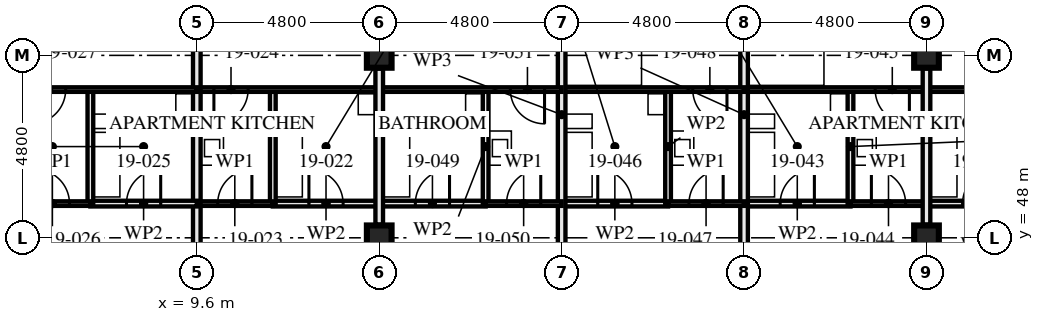
"""IFC4 building model, lengths in metres.
Left out: names, types, materials, properties, quantities, classifications, styles, units other than length and angle.
Written with IfcOpenShell. Run it as: python <this file> out.ifc"""

import sys

from ifc_helpers import new_model, si_unit, direction, frame, frame_2d, origin, origin_2d, place, context, subcontext, project, spatial, rectangle, hollow_rectangle, extrude, element, fill, save


model = new_model("IFC4")
c1 = context("Model", 3, precision=1e-05, world=origin(), true_north=direction((0.0, 1.0)))
c2 = subcontext(c1, "Body", "Model", "MODEL_VIEW")
j1 = project(units=[si_unit("LENGTHUNIT", "METRE"), si_unit("PLANEANGLEUNIT", "RADIAN")], contexts=[c1])
p1 = place(None, origin())
s1 = spatial("IfcSite", under=j1, at=p1, CompositionType="ELEMENT")
p2 = place(p1, origin())
s2 = spatial("IfcBuilding", under=s1, at=p2, CompositionType="ELEMENT")
p3 = place(p2, frame((0.0, 0.0, 72.5)))
s3 = spatial("IfcBuildingStorey", under=s2, at=p3, CompositionType="ELEMENT", Elevation=72.5)
for number, where, z_axis, x_axis in (
    (1, (14.4, 48.0, 0.0), (0.0, 0.0, 1.0), (1.0, 0.0, 0.0)),
    (2, (14.4, 52.8, 0.0), (0.0, 0.0, 1.0), (1.0, 0.0, 0.0)),
    (3, (28.8, 48.0, 0.0), (0.0, 0.0, 1.0), (1.0, 0.0, 0.0)),
    (4, (28.8, 52.8, 0.0), (0.0, 0.0, 1.0), (1.0, 0.0, 0.0)),
):
    element("IfcColumn", number, at=place(p3, frame(where, z_axis=z_axis, x_axis=x_axis)), inside=s3, PredefinedType="COLUMN", context=c2, shape_type="SweptSolid", body=[
        extrude(hollow_rectangle(XDim=0.65, YDim=0.65, WallThickness=0.05, at=origin_2d()), origin(), (0.0, 0.0, 1.0), 3.5),
    ])
p4 = place(p3, frame((11.6, 51.9, 0.0), z_axis=(0.0, 0.0, 1.0), x_axis=(0.0, -1.0, 0.0)))
e5 = element("IfcWall", 5, at=p4, inside=s3, PredefinedType="PARTITIONING", context=c2, shape_type="SweptSolid", body=[
    extrude(rectangle(XDim=3.0, YDim=0.15, at=frame_2d((1.5, 0.0))), origin(), (0.0, 0.0, 1.0), 3.33),
])
p5 = place(p3, frame((14.4, 48.9, 0.0), z_axis=(0.0, 0.0, 1.0), x_axis=(-1.0, 0.0, 0.0)))
e6 = element("IfcWall", 6, at=p5, inside=s3, PredefinedType="PARTITIONING", context=c2, shape_type="SweptSolid", body=[
    extrude(rectangle(XDim=2.8, YDim=0.15, at=frame_2d((1.4, 0.0))), origin(), (0.0, 0.0, 1.0), 3.33),
])
p6 = place(p5, frame((0.95, 0.0, 0.0)))
e7 = element("IfcOpeningElement", 7, at=p6, cuts=e6, PredefinedType="OPENING", context=c2, shape_type="SweptSolid", body=[
    extrude(rectangle(XDim=0.9, YDim=2.1, at=frame_2d((0.45, 1.05))), frame((0.0, 0.085, 0.0), z_axis=(0.0, -1.0, 0.0), x_axis=(1.0, 0.0, 0.0)), (0.0, 0.0, 1.0), 0.171),
])
p7 = place(p3, frame((11.6, 48.9, 0.0), z_axis=(0.0, 0.0, 1.0), x_axis=(-1.0, 0.0, 0.0)))
e8 = element("IfcWall", 8, at=p7, inside=s3, PredefinedType="PARTITIONING", context=c2, shape_type="SweptSolid", body=[
    extrude(rectangle(XDim=2.0, YDim=0.12, at=frame_2d((1.0, 0.0))), origin(), (0.0, 0.0, 1.0), 3.33),
])
p8 = place(p7, frame((0.55, 0.0, 0.0)))
e9 = element("IfcOpeningElement", 9, at=p8, cuts=e8, PredefinedType="OPENING", context=c2, shape_type="SweptSolid", body=[
    extrude(rectangle(XDim=0.9, YDim=2.1, at=frame_2d((0.45, 1.05))), frame((0.0, 0.071, 0.0), z_axis=(0.0, -1.0, 0.0), x_axis=(1.0, 0.0, 0.0)), (0.0, 0.0, 1.0), 0.141),
])
p9 = place(p3, frame((14.4, 51.9, 0.0), z_axis=(0.0, 0.0, 1.0), x_axis=(-1.0, 0.0, 0.0)))
e10 = element("IfcWall", 10, at=p9, inside=s3, PredefinedType="PARTITIONING", context=c2, shape_type="SweptSolid", body=[
    extrude(rectangle(XDim=4.8, YDim=0.12, at=frame_2d((2.4, 0.0))), origin(), (0.0, 0.0, 1.0), 3.33),
])
p10 = place(p9, frame((3.45, 0.0, 0.0)))
e11 = element("IfcOpeningElement", 11, at=p10, cuts=e10, PredefinedType="OPENING", context=c2, shape_type="SweptSolid", body=[
    extrude(rectangle(XDim=0.9, YDim=2.1, at=frame_2d((0.45, 1.05))), frame((0.0, 0.071, 0.0), z_axis=(0.0, -1.0, 0.0), x_axis=(1.0, 0.0, 0.0)), (0.0, 0.0, 1.0), 0.141),
])
p11 = place(p3, frame((9.6, 57.28, 0.0), z_axis=(0.0, 0.0, 1.0), x_axis=(0.0, -1.0, 0.0)))
e12 = element("IfcWall", 12, at=p11, inside=s3, PredefinedType="PARTITIONING", context=c2, shape_type="SweptSolid", body=[
    extrude(rectangle(XDim=12.08, YDim=0.2, at=frame_2d((6.04, 0.0))), origin(), (0.0, 0.0, 1.0), 2.55),
])
p12 = place(p3, frame((6.8, 51.9, 0.0), z_axis=(0.0, 0.0, 1.0), x_axis=(0.0, -1.0, 0.0)))
e13 = element("IfcWall", 13, at=p12, inside=s3, PredefinedType="PARTITIONING", context=c2, shape_type="SweptSolid", body=[
    extrude(rectangle(XDim=3.0, YDim=0.15, at=frame_2d((1.5, 0.0))), origin(), (0.0, 0.0, 1.0), 3.33),
])
p13 = place(p3, frame((9.6, 48.9, 0.0), z_axis=(0.0, 0.0, 1.0), x_axis=(-1.0, 0.0, 0.0)))
e14 = element("IfcWall", 14, at=p13, inside=s3, PredefinedType="PARTITIONING", context=c2, shape_type="SweptSolid", body=[
    extrude(rectangle(XDim=2.8, YDim=0.15, at=frame_2d((1.4, 0.0))), origin(), (0.0, 0.0, 1.0), 3.33),
])
p14 = place(p13, frame((0.95, 0.0, 0.0)))
e15 = element("IfcOpeningElement", 15, at=p14, cuts=e14, PredefinedType="OPENING", context=c2, shape_type="SweptSolid", body=[
    extrude(rectangle(XDim=0.9, YDim=2.1, at=frame_2d((0.45, 1.05))), frame((0.0, 0.085, 0.0), z_axis=(0.0, -1.0, 0.0), x_axis=(1.0, 0.0, 0.0)), (0.0, 0.0, 1.0), 0.171),
])
p15 = place(p3, frame((6.8, 48.9, 0.0), z_axis=(0.0, 0.0, 1.0), x_axis=(-1.0, 0.0, 0.0)))
e16 = element("IfcWall", 16, at=p15, inside=s3, PredefinedType="PARTITIONING", context=c2, shape_type="SweptSolid", body=[
    extrude(rectangle(XDim=2.0, YDim=0.12, at=frame_2d((1.0, 0.0))), origin(), (0.0, 0.0, 1.0), 3.33),
])
p16 = place(p15, frame((0.55, 0.0, 0.0)))
e17 = element("IfcOpeningElement", 17, at=p16, cuts=e16, PredefinedType="OPENING", context=c2, shape_type="SweptSolid", body=[
    extrude(rectangle(XDim=0.9, YDim=2.1, at=frame_2d((0.45, 1.05))), frame((0.0, 0.071, 0.0), z_axis=(0.0, -1.0, 0.0), x_axis=(1.0, 0.0, 0.0)), (0.0, 0.0, 1.0), 0.141),
])
p17 = place(p3, frame((9.6, 51.9, 0.0), z_axis=(0.0, 0.0, 1.0), x_axis=(-1.0, 0.0, 0.0)))
e18 = element("IfcWall", 18, at=p17, inside=s3, PredefinedType="PARTITIONING", context=c2, shape_type="SweptSolid", body=[
    extrude(rectangle(XDim=4.8, YDim=0.12, at=frame_2d((2.4, 0.0))), origin(), (0.0, 0.0, 1.0), 3.33),
])
p18 = place(p17, frame((3.45, 0.0, 0.0)))
e19 = element("IfcOpeningElement", 19, at=p18, cuts=e18, PredefinedType="OPENING", context=c2, shape_type="SweptSolid", body=[
    extrude(rectangle(XDim=0.9, YDim=2.1, at=frame_2d((0.45, 1.05))), frame((0.0, 0.071, 0.0), z_axis=(0.0, -1.0, 0.0), x_axis=(1.0, 0.0, 0.0)), (0.0, 0.0, 1.0), 0.141),
])
p19 = place(p3, frame((26.8, 51.9, 0.0), z_axis=(0.0, 0.0, 1.0), x_axis=(0.0, -1.0, 0.0)))
e20 = element("IfcWall", 20, at=p19, inside=s3, PredefinedType="PARTITIONING", context=c2, shape_type="SweptSolid", body=[
    extrude(rectangle(XDim=3.0, YDim=0.15, at=frame_2d((1.5, 0.0))), origin(), (0.0, 0.0, 1.0), 3.33),
])
p20 = place(p3, frame((26.8, 48.9, 0.0), z_axis=(0.0, 0.0, 1.0), x_axis=(-1.0, 0.0, 0.0)))
e21 = element("IfcWall", 21, at=p20, inside=s3, PredefinedType="PARTITIONING", context=c2, shape_type="SweptSolid", body=[
    extrude(rectangle(XDim=2.8, YDim=0.15, at=frame_2d((1.4, 0.0))), origin(), (0.0, 0.0, 1.0), 3.33),
])
p21 = place(p20, frame((0.95, 0.0, 0.0)))
e22 = element("IfcOpeningElement", 22, at=p21, cuts=e21, PredefinedType="OPENING", context=c2, shape_type="SweptSolid", body=[
    extrude(rectangle(XDim=0.9, YDim=2.1, at=frame_2d((0.45, 1.05))), frame((0.0, 0.085, 0.0), z_axis=(0.0, -1.0, 0.0), x_axis=(1.0, 0.0, 0.0)), (0.0, 0.0, 1.0), 0.171),
])
p22 = place(p3, frame((28.8, 48.9, 0.0), z_axis=(0.0, 0.0, 1.0), x_axis=(-1.0, 0.0, 0.0)))
e23 = element("IfcWall", 23, at=p22, inside=s3, PredefinedType="PARTITIONING", context=c2, shape_type="SweptSolid", body=[
    extrude(rectangle(XDim=2.0, YDim=0.12, at=frame_2d((1.0, 0.0))), origin(), (0.0, 0.0, 1.0), 3.33),
])
p23 = place(p22, frame((0.55, 0.0, 0.0)))
e24 = element("IfcOpeningElement", 24, at=p23, cuts=e23, PredefinedType="OPENING", context=c2, shape_type="SweptSolid", body=[
    extrude(rectangle(XDim=0.9, YDim=2.1, at=frame_2d((0.45, 1.05))), frame((0.0, 0.071, 0.0), z_axis=(0.0, -1.0, 0.0), x_axis=(1.0, 0.0, 0.0)), (0.0, 0.0, 1.0), 0.141),
])
p24 = place(p3, frame((28.8, 51.9, 0.0), z_axis=(0.0, 0.0, 1.0), x_axis=(-1.0, 0.0, 0.0)))
e25 = element("IfcWall", 25, at=p24, inside=s3, PredefinedType="PARTITIONING", context=c2, shape_type="SweptSolid", body=[
    extrude(rectangle(XDim=4.8, YDim=0.12, at=frame_2d((2.4, 0.0))), origin(), (0.0, 0.0, 1.0), 3.33),
])
p25 = place(p24, frame((0.45, 0.0, 0.0)))
e26 = element("IfcOpeningElement", 26, at=p25, cuts=e25, PredefinedType="OPENING", context=c2, shape_type="SweptSolid", body=[
    extrude(rectangle(XDim=0.9, YDim=2.1, at=frame_2d((0.45, 1.05))), frame((0.0, 0.071, 0.0), z_axis=(0.0, -1.0, 0.0), x_axis=(1.0, 0.0, 0.0)), (0.0, 0.0, 1.0), 0.141),
])
p26 = place(p3, frame((24.0, 57.28, 0.0), z_axis=(0.0, 0.0, 1.0), x_axis=(0.0, -1.0, 0.0)))
e27 = element("IfcWall", 27, at=p26, inside=s3, PredefinedType="PARTITIONING", context=c2, shape_type="SweptSolid", body=[
    extrude(rectangle(XDim=12.08, YDim=0.2, at=frame_2d((6.04, 0.0))), origin(), (0.0, 0.0, 1.0), 2.55),
])
p27 = place(p3, frame((22.0, 51.9, 0.0), z_axis=(0.0, 0.0, 1.0), x_axis=(0.0, -1.0, 0.0)))
e28 = element("IfcWall", 28, at=p27, inside=s3, PredefinedType="PARTITIONING", context=c2, shape_type="SweptSolid", body=[
    extrude(rectangle(XDim=3.0, YDim=0.15, at=frame_2d((1.5, 0.0))), origin(), (0.0, 0.0, 1.0), 3.33),
])
p28 = place(p3, frame((22.0, 48.9, 0.0), z_axis=(0.0, 0.0, 1.0), x_axis=(-1.0, 0.0, 0.0)))
e29 = element("IfcWall", 29, at=p28, inside=s3, PredefinedType="PARTITIONING", context=c2, shape_type="SweptSolid", body=[
    extrude(rectangle(XDim=2.8, YDim=0.15, at=frame_2d((1.4, 0.0))), origin(), (0.0, 0.0, 1.0), 3.33),
])
p29 = place(p28, frame((0.95, 0.0, 0.0)))
e30 = element("IfcOpeningElement", 30, at=p29, cuts=e29, PredefinedType="OPENING", context=c2, shape_type="SweptSolid", body=[
    extrude(rectangle(XDim=0.9, YDim=2.1, at=frame_2d((0.45, 1.05))), frame((0.0, 0.085, 0.0), z_axis=(0.0, -1.0, 0.0), x_axis=(1.0, 0.0, 0.0)), (0.0, 0.0, 1.0), 0.171),
])
p30 = place(p3, frame((24.0, 48.9, 0.0), z_axis=(0.0, 0.0, 1.0), x_axis=(-1.0, 0.0, 0.0)))
e31 = element("IfcWall", 31, at=p30, inside=s3, PredefinedType="PARTITIONING", context=c2, shape_type="SweptSolid", body=[
    extrude(rectangle(XDim=2.0, YDim=0.12, at=frame_2d((1.0, 0.0))), origin(), (0.0, 0.0, 1.0), 3.33),
])
p31 = place(p30, frame((0.55, 0.0, 0.0)))
e32 = element("IfcOpeningElement", 32, at=p31, cuts=e31, PredefinedType="OPENING", context=c2, shape_type="SweptSolid", body=[
    extrude(rectangle(XDim=0.9, YDim=2.1, at=frame_2d((0.45, 1.05))), frame((0.0, 0.071, 0.0), z_axis=(0.0, -1.0, 0.0), x_axis=(1.0, 0.0, 0.0)), (0.0, 0.0, 1.0), 0.141),
])
p32 = place(p3, frame((24.0, 51.9, 0.0), z_axis=(0.0, 0.0, 1.0), x_axis=(-1.0, 0.0, 0.0)))
e33 = element("IfcWall", 33, at=p32, inside=s3, PredefinedType="PARTITIONING", context=c2, shape_type="SweptSolid", body=[
    extrude(rectangle(XDim=4.8, YDim=0.12, at=frame_2d((2.4, 0.0))), origin(), (0.0, 0.0, 1.0), 3.33),
])
p33 = place(p32, frame((0.45, 0.0, 0.0)))
e34 = element("IfcOpeningElement", 34, at=p33, cuts=e33, PredefinedType="OPENING", context=c2, shape_type="SweptSolid", body=[
    extrude(rectangle(XDim=0.9, YDim=2.1, at=frame_2d((0.45, 1.05))), frame((0.0, 0.071, 0.0), z_axis=(0.0, -1.0, 0.0), x_axis=(1.0, 0.0, 0.0)), (0.0, 0.0, 1.0), 0.141),
])
p34 = place(p3, frame((19.2, 57.28, 0.0), z_axis=(0.0, 0.0, 1.0), x_axis=(0.0, -1.0, 0.0)))
e35 = element("IfcWall", 35, at=p34, inside=s3, PredefinedType="PARTITIONING", context=c2, shape_type="SweptSolid", body=[
    extrude(rectangle(XDim=12.08, YDim=0.2, at=frame_2d((6.04, 0.0))), origin(), (0.0, 0.0, 1.0), 2.55),
])
p35 = place(p3, frame((17.2, 51.9, 0.0), z_axis=(0.0, 0.0, 1.0), x_axis=(0.0, -1.0, 0.0)))
e36 = element("IfcWall", 36, at=p35, inside=s3, PredefinedType="PARTITIONING", context=c2, shape_type="SweptSolid", body=[
    extrude(rectangle(XDim=3.0, YDim=0.15, at=frame_2d((1.5, 0.0))), origin(), (0.0, 0.0, 1.0), 3.33),
])
p36 = place(p3, frame((17.2, 48.9, 0.0), z_axis=(0.0, 0.0, 1.0), x_axis=(-1.0, 0.0, 0.0)))
e37 = element("IfcWall", 37, at=p36, inside=s3, PredefinedType="PARTITIONING", context=c2, shape_type="SweptSolid", body=[
    extrude(rectangle(XDim=2.8, YDim=0.15, at=frame_2d((1.4, 0.0))), origin(), (0.0, 0.0, 1.0), 3.33),
])
p37 = place(p36, frame((0.95, 0.0, 0.0)))
e38 = element("IfcOpeningElement", 38, at=p37, cuts=e37, PredefinedType="OPENING", context=c2, shape_type="SweptSolid", body=[
    extrude(rectangle(XDim=0.9, YDim=2.1, at=frame_2d((0.45, 1.05))), frame((0.0, 0.085, 0.0), z_axis=(0.0, -1.0, 0.0), x_axis=(1.0, 0.0, 0.0)), (0.0, 0.0, 1.0), 0.171),
])
p38 = place(p3, frame((19.2, 48.9, 0.0), z_axis=(0.0, 0.0, 1.0), x_axis=(-1.0, 0.0, 0.0)))
e39 = element("IfcWall", 39, at=p38, inside=s3, PredefinedType="PARTITIONING", context=c2, shape_type="SweptSolid", body=[
    extrude(rectangle(XDim=2.0, YDim=0.12, at=frame_2d((1.0, 0.0))), origin(), (0.0, 0.0, 1.0), 3.33),
])
p39 = place(p38, frame((0.55, 0.0, 0.0)))
e40 = element("IfcOpeningElement", 40, at=p39, cuts=e39, PredefinedType="OPENING", context=c2, shape_type="SweptSolid", body=[
    extrude(rectangle(XDim=0.9, YDim=2.1, at=frame_2d((0.45, 1.05))), frame((0.0, 0.071, 0.0), z_axis=(0.0, -1.0, 0.0), x_axis=(1.0, 0.0, 0.0)), (0.0, 0.0, 1.0), 0.141),
])
p40 = place(p3, frame((19.2, 51.9, 0.0), z_axis=(0.0, 0.0, 1.0), x_axis=(-1.0, 0.0, 0.0)))
e41 = element("IfcWall", 41, at=p40, inside=s3, PredefinedType="PARTITIONING", context=c2, shape_type="SweptSolid", body=[
    extrude(rectangle(XDim=4.8, YDim=0.12, at=frame_2d((2.4, 0.0))), origin(), (0.0, 0.0, 1.0), 3.33),
])
p41 = place(p40, frame((0.45, 0.0, 0.0)))
e42 = element("IfcOpeningElement", 42, at=p41, cuts=e41, PredefinedType="OPENING", context=c2, shape_type="SweptSolid", body=[
    extrude(rectangle(XDim=0.9, YDim=2.1, at=frame_2d((0.45, 1.05))), frame((0.0, 0.071, 0.0), z_axis=(0.0, -1.0, 0.0), x_axis=(1.0, 0.0, 0.0)), (0.0, 0.0, 1.0), 0.141),
])
p42 = place(p3, frame((31.6, 48.9, 0.0), z_axis=(0.0, 0.0, 1.0), x_axis=(-1.0, 0.0, 0.0)))
e43 = element("IfcWall", 43, at=p42, inside=s3, PredefinedType="PARTITIONING", context=c2, shape_type="SweptSolid", body=[
    extrude(rectangle(XDim=2.8, YDim=0.15, at=frame_2d((1.4, 0.0))), origin(), (0.0, 0.0, 1.0), 3.33),
])
p43 = place(p42, frame((0.95, 0.0, 0.0)))
e44 = element("IfcOpeningElement", 44, at=p43, cuts=e43, PredefinedType="OPENING", context=c2, shape_type="SweptSolid", body=[
    extrude(rectangle(XDim=0.9, YDim=2.1, at=frame_2d((0.45, 1.05))), frame((0.0, 0.085, 0.0), z_axis=(0.0, -1.0, 0.0), x_axis=(1.0, 0.0, 0.0)), (0.0, 0.0, 1.0), 0.171),
])
p44 = place(p3, frame((33.6, 51.9, 0.0), z_axis=(0.0, 0.0, 1.0), x_axis=(-1.0, 0.0, 0.0)))
e45 = element("IfcWall", 45, at=p44, inside=s3, PredefinedType="PARTITIONING", context=c2, shape_type="SweptSolid", body=[
    extrude(rectangle(XDim=4.8, YDim=0.12, at=frame_2d((2.4, 0.0))), origin(), (0.0, 0.0, 1.0), 3.33),
])
p45 = place(p44, frame((0.45, 0.0, 0.0)))
e46 = element("IfcOpeningElement", 46, at=p45, cuts=e45, PredefinedType="OPENING", context=c2, shape_type="SweptSolid", body=[
    extrude(rectangle(XDim=0.9, YDim=2.1, at=frame_2d((0.45, 1.05))), frame((0.0, 0.071, 0.0), z_axis=(0.0, -1.0, 0.0), x_axis=(1.0, 0.0, 0.0)), (0.0, 0.0, 1.0), 0.141),
])
for number, where, z_axis, x_axis in (
    (47, (14.4, 48.345, 0.0), (0.0, 0.0, 1.0), (0.0, 1.0, 0.0)),
    (48, (28.8, 48.345, 0.0), (0.0, 0.0, 1.0), (0.0, 1.0, 0.0)),
):
    element("IfcWall", number, at=place(p3, frame(where, z_axis=z_axis, x_axis=x_axis)), inside=s3, PredefinedType="PARTITIONING", context=c2, shape_type="SweptSolid", body=[
        extrude(rectangle(XDim=4.11, YDim=0.2, at=frame_2d((2.055, 0.0))), origin(), (0.0, 0.0, 1.0), 2.32),
    ])
p46 = place(p6, frame((0.9, 0.0, 0.0), z_axis=(0.0, 0.0, 1.0), x_axis=(-1.0, 0.0, 0.0)))
e49 = element("IfcDoor", 49, at=p46, inside=s3, OperationType="SINGLE_SWING_RIGHT", PredefinedType="DOOR", context=c2, shape_type="SweptSolid", body=[
    extrude(rectangle(XDim=0.9, YDim=2.1, at=frame_2d((0.45, 1.05))), frame((0.0, 0.022, 0.0), z_axis=(0.0, -1.0, 0.0), x_axis=(1.0, 0.0, 0.0)), (0.0, 0.0, 1.0), 0.044),
])
fill(e7, e49)
p47 = place(p8, frame((0.9, 0.0, 0.0), z_axis=(0.0, 0.0, 1.0), x_axis=(-1.0, 0.0, 0.0)))
e50 = element("IfcDoor", 50, at=p47, inside=s3, OperationType="SINGLE_SWING_LEFT", PredefinedType="DOOR", context=c2, shape_type="SweptSolid", body=[
    extrude(rectangle(XDim=0.9, YDim=2.1, at=frame_2d((0.45, 1.05))), frame((0.0, 0.022, 0.0), z_axis=(0.0, -1.0, 0.0), x_axis=(1.0, 0.0, 0.0)), (0.0, 0.0, 1.0), 0.044),
])
fill(e9, e50)
p48 = place(p10, origin())
e51 = element("IfcDoor", 51, at=p48, inside=s3, OperationType="SINGLE_SWING_LEFT", PredefinedType="DOOR", context=c2, shape_type="SweptSolid", body=[
    extrude(rectangle(XDim=0.9, YDim=2.1, at=frame_2d((0.45, 1.05))), frame((0.0, 0.022, 0.0), z_axis=(0.0, -1.0, 0.0), x_axis=(1.0, 0.0, 0.0)), (0.0, 0.0, 1.0), 0.044),
])
fill(e11, e51)
p49 = place(p14, frame((0.9, 0.0, 0.0), z_axis=(0.0, 0.0, 1.0), x_axis=(-1.0, 0.0, 0.0)))
e52 = element("IfcDoor", 52, at=p49, inside=s3, OperationType="SINGLE_SWING_LEFT", PredefinedType="DOOR", context=c2, shape_type="SweptSolid", body=[
    extrude(rectangle(XDim=0.9, YDim=2.1, at=frame_2d((0.45, 1.05))), frame((0.0, 0.022, 0.0), z_axis=(0.0, -1.0, 0.0), x_axis=(1.0, 0.0, 0.0)), (0.0, 0.0, 1.0), 0.044),
])
fill(e15, e52)
p50 = place(p16, frame((0.9, 0.0, 0.0), z_axis=(0.0, 0.0, 1.0), x_axis=(-1.0, 0.0, 0.0)))
e53 = element("IfcDoor", 53, at=p50, inside=s3, OperationType="SINGLE_SWING_RIGHT", PredefinedType="DOOR", context=c2, shape_type="SweptSolid", body=[
    extrude(rectangle(XDim=0.9, YDim=2.1, at=frame_2d((0.45, 1.05))), frame((0.0, 0.022, 0.0), z_axis=(0.0, -1.0, 0.0), x_axis=(1.0, 0.0, 0.0)), (0.0, 0.0, 1.0), 0.044),
])
fill(e17, e53)
p51 = place(p18, origin())
e54 = element("IfcDoor", 54, at=p51, inside=s3, OperationType="SINGLE_SWING_LEFT", PredefinedType="DOOR", context=c2, shape_type="SweptSolid", body=[
    extrude(rectangle(XDim=0.9, YDim=2.1, at=frame_2d((0.45, 1.05))), frame((0.0, 0.022, 0.0), z_axis=(0.0, -1.0, 0.0), x_axis=(1.0, 0.0, 0.0)), (0.0, 0.0, 1.0), 0.044),
])
fill(e19, e54)
p52 = place(p21, frame((0.9, 0.0, 0.0), z_axis=(0.0, 0.0, 1.0), x_axis=(-1.0, 0.0, 0.0)))
e55 = element("IfcDoor", 55, at=p52, inside=s3, OperationType="SINGLE_SWING_LEFT", PredefinedType="DOOR", context=c2, shape_type="SweptSolid", body=[
    extrude(rectangle(XDim=0.9, YDim=2.1, at=frame_2d((0.45, 1.05))), frame((0.0, 0.022, 0.0), z_axis=(0.0, -1.0, 0.0), x_axis=(1.0, 0.0, 0.0)), (0.0, 0.0, 1.0), 0.044),
])
fill(e22, e55)
p53 = place(p23, frame((0.9, 0.0, 0.0), z_axis=(0.0, 0.0, 1.0), x_axis=(-1.0, 0.0, 0.0)))
e56 = element("IfcDoor", 56, at=p53, inside=s3, OperationType="SINGLE_SWING_RIGHT", PredefinedType="DOOR", context=c2, shape_type="SweptSolid", body=[
    extrude(rectangle(XDim=0.9, YDim=2.1, at=frame_2d((0.45, 1.05))), frame((0.0, 0.022, 0.0), z_axis=(0.0, -1.0, 0.0), x_axis=(1.0, 0.0, 0.0)), (0.0, 0.0, 1.0), 0.044),
])
fill(e24, e56)
p54 = place(p25, origin())
e57 = element("IfcDoor", 57, at=p54, inside=s3, OperationType="SINGLE_SWING_RIGHT", PredefinedType="DOOR", context=c2, shape_type="SweptSolid", body=[
    extrude(rectangle(XDim=0.9, YDim=2.1, at=frame_2d((0.45, 1.05))), frame((0.0, 0.022, 0.0), z_axis=(0.0, -1.0, 0.0), x_axis=(1.0, 0.0, 0.0)), (0.0, 0.0, 1.0), 0.044),
])
fill(e26, e57)
p55 = place(p29, frame((0.9, 0.0, 0.0), z_axis=(0.0, 0.0, 1.0), x_axis=(-1.0, 0.0, 0.0)))
e58 = element("IfcDoor", 58, at=p55, inside=s3, OperationType="SINGLE_SWING_RIGHT", PredefinedType="DOOR", context=c2, shape_type="SweptSolid", body=[
    extrude(rectangle(XDim=0.9, YDim=2.1, at=frame_2d((0.45, 1.05))), frame((0.0, 0.022, 0.0), z_axis=(0.0, -1.0, 0.0), x_axis=(1.0, 0.0, 0.0)), (0.0, 0.0, 1.0), 0.044),
])
fill(e30, e58)
p56 = place(p31, frame((0.9, 0.0, 0.0), z_axis=(0.0, 0.0, 1.0), x_axis=(-1.0, 0.0, 0.0)))
e59 = element("IfcDoor", 59, at=p56, inside=s3, OperationType="SINGLE_SWING_LEFT", PredefinedType="DOOR", context=c2, shape_type="SweptSolid", body=[
    extrude(rectangle(XDim=0.9, YDim=2.1, at=frame_2d((0.45, 1.05))), frame((0.0, 0.022, 0.0), z_axis=(0.0, -1.0, 0.0), x_axis=(1.0, 0.0, 0.0)), (0.0, 0.0, 1.0), 0.044),
])
fill(e32, e59)
p57 = place(p33, origin())
e60 = element("IfcDoor", 60, at=p57, inside=s3, OperationType="SINGLE_SWING_RIGHT", PredefinedType="DOOR", context=c2, shape_type="SweptSolid", body=[
    extrude(rectangle(XDim=0.9, YDim=2.1, at=frame_2d((0.45, 1.05))), frame((0.0, 0.022, 0.0), z_axis=(0.0, -1.0, 0.0), x_axis=(1.0, 0.0, 0.0)), (0.0, 0.0, 1.0), 0.044),
])
fill(e34, e60)
p58 = place(p37, frame((0.9, 0.0, 0.0), z_axis=(0.0, 0.0, 1.0), x_axis=(-1.0, 0.0, 0.0)))
e61 = element("IfcDoor", 61, at=p58, inside=s3, OperationType="SINGLE_SWING_LEFT", PredefinedType="DOOR", context=c2, shape_type="SweptSolid", body=[
    extrude(rectangle(XDim=0.9, YDim=2.1, at=frame_2d((0.45, 1.05))), frame((0.0, 0.022, 0.0), z_axis=(0.0, -1.0, 0.0), x_axis=(1.0, 0.0, 0.0)), (0.0, 0.0, 1.0), 0.044),
])
fill(e38, e61)
p59 = place(p39, frame((0.9, 0.0, 0.0), z_axis=(0.0, 0.0, 1.0), x_axis=(-1.0, 0.0, 0.0)))
e62 = element("IfcDoor", 62, at=p59, inside=s3, OperationType="SINGLE_SWING_LEFT", PredefinedType="DOOR", context=c2, shape_type="SweptSolid", body=[
    extrude(rectangle(XDim=0.9, YDim=2.1, at=frame_2d((0.45, 1.05))), frame((0.0, 0.022, 0.0), z_axis=(0.0, -1.0, 0.0), x_axis=(1.0, 0.0, 0.0)), (0.0, 0.0, 1.0), 0.044),
])
fill(e40, e62)
p60 = place(p41, origin())
e63 = element("IfcDoor", 63, at=p60, inside=s3, OperationType="SINGLE_SWING_RIGHT", PredefinedType="DOOR", context=c2, shape_type="SweptSolid", body=[
    extrude(rectangle(XDim=0.9, YDim=2.1, at=frame_2d((0.45, 1.05))), frame((0.0, 0.022, 0.0), z_axis=(0.0, -1.0, 0.0), x_axis=(1.0, 0.0, 0.0)), (0.0, 0.0, 1.0), 0.044),
])
fill(e42, e63)
p61 = place(p43, frame((0.9, 0.0, 0.0), z_axis=(0.0, 0.0, 1.0), x_axis=(-1.0, 0.0, 0.0)))
e64 = element("IfcDoor", 64, at=p61, inside=s3, OperationType="SINGLE_SWING_LEFT", PredefinedType="DOOR", context=c2, shape_type="SweptSolid", body=[
    extrude(rectangle(XDim=0.9, YDim=2.1, at=frame_2d((0.45, 1.05))), frame((0.0, 0.022, 0.0), z_axis=(0.0, -1.0, 0.0), x_axis=(1.0, 0.0, 0.0)), (0.0, 0.0, 1.0), 0.044),
])
fill(e44, e64)
save(model, sys.argv[1])
